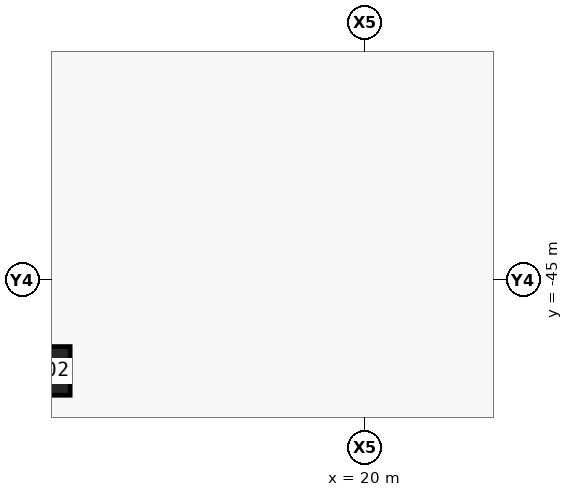
"""IFC4 building model, lengths in metres.
Left out: names, types, materials, properties, quantities, classifications, styles, units other than length and angle.
Written with IfcOpenShell. Run it as: python <this file> out.ifc"""

import sys

from ifc_helpers import new_model, si_unit, direction, frame, origin, origin_2d, place, context, subcontext, project, spatial, rectangle, extrude, element, save


model = new_model("IFC4")
c1 = context("Model", 3, precision=1e-05, world=origin(), true_north=direction((0.0, 1.0)))
c2 = subcontext(c1, "Body", "Model", "MODEL_VIEW")
j1 = project(units=[si_unit("LENGTHUNIT", "METRE"), si_unit("PLANEANGLEUNIT", "RADIAN")], contexts=[c1])
p1 = place(None, origin())
s1 = spatial("IfcSite", under=j1, at=p1, CompositionType="ELEMENT")
p2 = place(p1, origin())
s2 = spatial("IfcBuilding", under=s1, at=p2, CompositionType="ELEMENT")
p3 = place(p2, frame((0.0, 0.0, -4.5)))
s3 = spatial("IfcBuildingStorey", under=s2, at=p3, CompositionType="ELEMENT", Elevation=-4.5)
p4 = place(p3, frame((9.5, -48.0, 0.0), z_axis=(0.0, 0.0, 1.0), x_axis=(1.0, 0.0, 0.0)))
e1 = element("IfcColumn", 1, at=p4, inside=s3, PredefinedType="COLUMN", context=c2, shape_type="SweptSolid", body=[
    extrude(rectangle(XDim=1.6, YDim=1.6, at=origin_2d()), origin(), (0.0, 0.0, 1.0), 4.5),
])
save(model, sys.argv[1])
